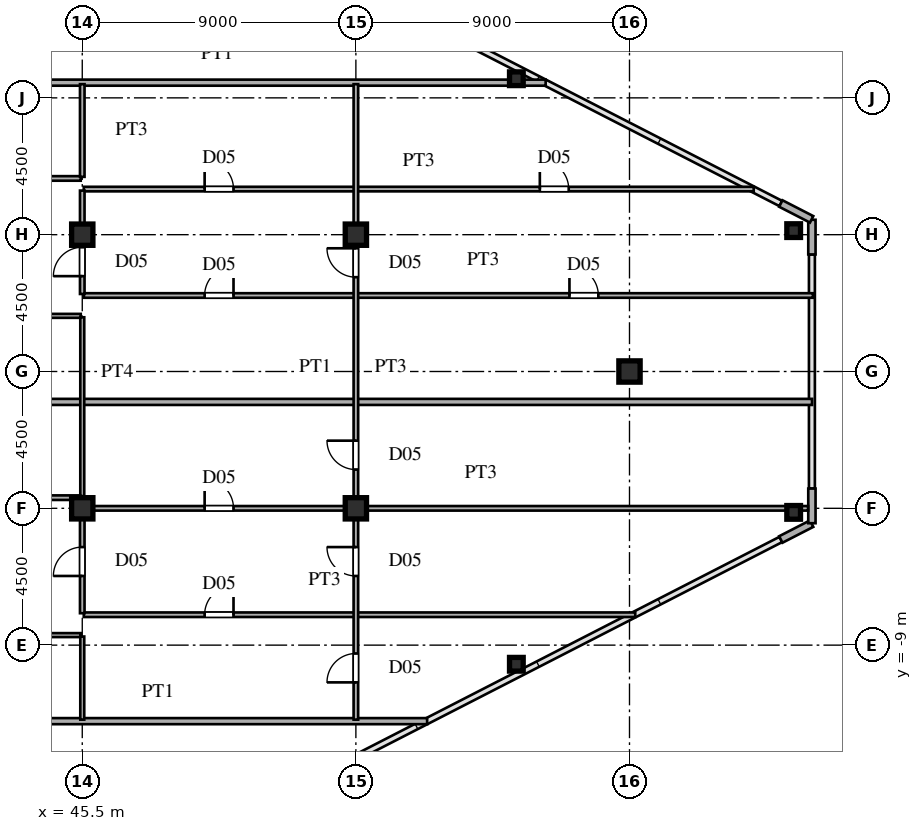
"""IFC4 building model, lengths in metres.
Left out: names, types, materials, properties, quantities, classifications, styles, units other than length and angle.
Written with IfcOpenShell. Run it as: python <this file> out.ifc"""

import sys

from ifc_helpers import new_model, si_unit, direction, frame, frame_2d, origin, origin_2d, place, context, subcontext, project, spatial, rectangle, hollow_rectangle, i_section, extrude, source, transform, mapped, element, fill, save


model = new_model("IFC4")
c1 = context("Model", 3, precision=1e-05, world=origin(), true_north=direction((0.0, 1.0)))
c2 = subcontext(c1, "Body", "Model", "MODEL_VIEW")
j1 = project(units=[si_unit("LENGTHUNIT", "METRE"), si_unit("PLANEANGLEUNIT", "RADIAN")], contexts=[c1])
p1 = place(None, origin())
s1 = spatial("IfcSite", under=j1, at=p1, CompositionType="ELEMENT")
p2 = place(p1, origin())
s2 = spatial("IfcBuilding", under=s1, at=p2, CompositionType="ELEMENT")
p3 = place(p2, frame((0.0, 0.0, 147.6)))
s3 = spatial("IfcBuildingStorey", under=s2, at=p3, CompositionType="ELEMENT", Elevation=147.6)
m1 = source(origin(), c2, "Body", "SweptSolid", [
    extrude(i_section(OverallWidth=0.7, OverallDepth=0.7, WebThickness=0.028, FlangeThickness=0.045, at=origin_2d()), origin(), (0.0, 0.0, 1.0), 3.6),
])
for number, where, z_axis, x_axis in (
    (1, (45.5, -4.5, 0.0), (0.0, 0.0, 1.0), (1.0, 0.0, 0.0)),
    (2, (45.5, 4.5, 0.0), (0.0, 0.0, 1.0), (1.0, 0.0, 0.0)),
    (3, (54.5, -4.5, 0.0), (0.0, 0.0, 1.0), (1.0, 0.0, 0.0)),
    (4, (54.5, 4.5, 0.0), (0.0, 0.0, 1.0), (1.0, 0.0, 0.0)),
    (5, (63.5, 0.0, 0.0), (0.0, 0.0, 1.0), (1.0, 0.0, 0.0)),
):
    element("IfcColumn", number, at=place(p3, frame(where, z_axis=z_axis, x_axis=x_axis)), inside=s3, PredefinedType="COLUMN", context=c2, shape_type="MappedRepresentation", body=[
        mapped(m1, transform((0.0, 0.0, 0.0), scale=1.0)),
    ])
m2 = source(origin(), c2, "Body", "SweptSolid", [
    extrude(hollow_rectangle(XDim=0.45, YDim=0.45, WallThickness=0.018, at=origin_2d()), origin(), (0.0, 0.0, 1.0), 3.6),
])
for number, where, z_axis, x_axis in (
    (6, (68.9, -4.634, 0.0), (0.0, 0.0, 1.0), (1.0, 0.0, 0.0)),
    (7, (68.9, 4.634, 0.0), (0.0, 0.0, 1.0), (1.0, 0.0, 0.0)),
    (8, (59.779, -9.629, 0.0), (0.0, 0.0, 1.0), (1.0, 0.0, 0.0)),
    (9, (59.779, 9.629, 0.0), (0.0, 0.0, 1.0), (1.0, 0.0, 0.0)),
):
    element("IfcColumn", number, at=place(p3, frame(where, z_axis=z_axis, x_axis=x_axis)), inside=s3, PredefinedType="COLUMN", context=c2, shape_type="MappedRepresentation", body=[
        mapped(m2, transform((0.0, 0.0, 0.0), scale=1.0)),
    ])
p4 = place(p3, frame((68.477, -5.525, 0.0), z_axis=(0.0, 0.0, 1.0), x_axis=(0.889797395748, 0.456355776255, 0.0)))
e10 = element("IfcWall", 10, at=p4, inside=s3, PredefinedType="SOLIDWALL", context=c2, shape_type="SweptSolid", body=[
    extrude(rectangle(XDim=1.14, YDim=0.24, at=frame_2d((0.57, 0.0))), origin(), (0.0, 0.0, 1.0), 3.38),
])
for number, where, z_axis, x_axis in (
    (11, (69.5, -4.99, 0.0), (0.0, 0.0, 1.0), (0.0, 1.0, 0.0)),
    (12, (69.5, 3.85, 0.0), (0.0, 0.0, 1.0), (0.0, 1.0, 0.0)),
):
    element("IfcWall", number, at=place(p3, frame(where, z_axis=z_axis, x_axis=x_axis)), inside=s3, PredefinedType="SOLIDWALL", context=c2, shape_type="SweptSolid", body=[
        extrude(rectangle(XDim=1.14, YDim=0.24, at=frame_2d((0.57, 0.0))), origin(), (0.0, 0.0, 1.0), 3.38),
    ])
p5 = place(p3, frame((69.491, 5.005, 0.0), z_axis=(0.0, 0.0, 1.0), x_axis=(-0.889797395748, 0.456355776255, 0.0)))
e13 = element("IfcWall", 13, at=p5, inside=s3, PredefinedType="SOLIDWALL", context=c2, shape_type="SweptSolid", body=[
    extrude(rectangle(XDim=1.14, YDim=0.24, at=frame_2d((0.57, 0.0))), origin(), (0.0, 0.0, 1.0), 3.38),
])
p6 = place(p3, frame((39.13, -11.5, 0.0), z_axis=(0.0, 0.0, 1.0), x_axis=(1.0, 0.0, 0.0)))
e14 = element("IfcWall", 14, at=p6, inside=s3, PredefinedType="PARTITIONING", context=c2, shape_type="SweptSolid", body=[
    extrude(rectangle(XDim=17.714, YDim=0.2, at=frame_2d((8.857, 0.0))), origin(), (0.0, 0.0, 1.0), 3.38),
])
p7 = place(p3, frame((39.1, -8.67, 0.0), z_axis=(0.0, 0.0, 1.0), x_axis=(1.0, 0.0, 0.0)))
e15 = element("IfcWall", 15, at=p7, inside=s3, PredefinedType="PARTITIONING", context=c2, shape_type="SweptSolid", body=[
    extrude(rectangle(XDim=6.35, YDim=0.13, at=frame_2d((3.175, 0.0))), origin(), (0.0, 0.0, 1.0), 3.38),
])
p8 = place(p7, frame((2.735, 0.0, 0.0)))
e16 = element("IfcOpeningElement", 16, at=p8, cuts=e15, PredefinedType="OPENING", context=c2, shape_type="SweptSolid", body=[
    extrude(rectangle(XDim=0.88, YDim=2.1, at=frame_2d((0.44, 1.05))), frame((0.0, 0.075, 0.0), z_axis=(0.0, -1.0, 0.0), x_axis=(1.0, 0.0, 0.0)), (0.0, 0.0, 1.0), 0.15),
])
p9 = place(p3, frame((45.55, -8.0, 0.0), z_axis=(0.0, 0.0, 1.0), x_axis=(1.0, 0.0, 0.0)))
e17 = element("IfcWall", 17, at=p9, inside=s3, PredefinedType="PARTITIONING", context=c2, shape_type="SweptSolid", body=[
    extrude(rectangle(XDim=18.139, YDim=0.15, at=frame_2d((9.069, 0.0))), origin(), (0.0, 0.0, 1.0), 3.38),
])
p10 = place(p9, frame((3.975, 0.0, 0.0)))
e18 = element("IfcOpeningElement", 18, at=p10, cuts=e17, PredefinedType="OPENING", context=c2, shape_type="SweptSolid", body=[
    extrude(rectangle(XDim=0.95, YDim=2.15, at=frame_2d((0.475, 1.075))), frame((0.0, 0.085, 0.0), z_axis=(0.0, -1.0, 0.0), x_axis=(1.0, 0.0, 0.0)), (0.0, 0.0, 1.0), 0.17),
])
p11 = place(p3, frame((45.55, -4.5, 0.0), z_axis=(0.0, 0.0, 1.0), x_axis=(1.0, 0.0, 0.0)))
e19 = element("IfcWall", 19, at=p11, inside=s3, PredefinedType="PARTITIONING", context=c2, shape_type="SweptSolid", body=[
    extrude(rectangle(XDim=23.825, YDim=0.15, at=frame_2d((11.913, 0.0))), origin(), (0.0, 0.0, 1.0), 2.78),
])
p12 = place(p11, frame((3.975, 0.0, 0.0)))
e20 = element("IfcOpeningElement", 20, at=p12, cuts=e19, PredefinedType="OPENING", context=c2, shape_type="SweptSolid", body=[
    extrude(rectangle(XDim=0.95, YDim=2.15, at=frame_2d((0.475, 1.075))), frame((0.0, 0.085, 0.0), z_axis=(0.0, -1.0, 0.0), x_axis=(1.0, 0.0, 0.0)), (0.0, 0.0, 1.0), 0.17),
])
p13 = place(p3, frame((39.1, -4.15, 0.0), z_axis=(0.0, 0.0, 1.0), x_axis=(1.0, 0.0, 0.0)))
e21 = element("IfcWall", 21, at=p13, inside=s3, PredefinedType="PARTITIONING", context=c2, shape_type="SweptSolid", body=[
    extrude(rectangle(XDim=6.35, YDim=0.15, at=frame_2d((3.175, 0.0))), origin(), (0.0, 0.0, 1.0), 3.38),
])
p14 = place(p13, frame((2.7, 0.0, 0.0)))
e22 = element("IfcOpeningElement", 22, at=p14, cuts=e21, PredefinedType="OPENING", context=c2, shape_type="SweptSolid", body=[
    extrude(rectangle(XDim=0.95, YDim=2.15, at=frame_2d((0.475, 1.075))), frame((0.0, 0.085, 0.0), z_axis=(0.0, -1.0, 0.0), x_axis=(1.0, 0.0, 0.0)), (0.0, 0.0, 1.0), 0.17),
])
p15 = place(p3, frame((39.13, -1.0, 0.0), z_axis=(0.0, 0.0, 1.0), x_axis=(1.0, 0.0, 0.0)))
e23 = element("IfcWall", 23, at=p15, inside=s3, PredefinedType="PARTITIONING", context=c2, shape_type="SweptSolid", body=[
    extrude(rectangle(XDim=30.375, YDim=0.2, at=frame_2d((15.188, 0.0))), origin(), (0.0, 0.0, 1.0), 3.38),
])
p16 = place(p3, frame((39.1, 1.83, 0.0), z_axis=(0.0, 0.0, 1.0), x_axis=(1.0, 0.0, 0.0)))
e24 = element("IfcWall", 24, at=p16, inside=s3, PredefinedType="PARTITIONING", context=c2, shape_type="SweptSolid", body=[
    extrude(rectangle(XDim=6.35, YDim=0.13, at=frame_2d((3.175, 0.0))), origin(), (0.0, 0.0, 1.0), 3.38),
])
p17 = place(p16, frame((2.735, 0.0, 0.0)))
e25 = element("IfcOpeningElement", 25, at=p17, cuts=e24, PredefinedType="OPENING", context=c2, shape_type="SweptSolid", body=[
    extrude(rectangle(XDim=0.88, YDim=2.1, at=frame_2d((0.44, 1.05))), frame((0.0, 0.075, 0.0), z_axis=(0.0, -1.0, 0.0), x_axis=(1.0, 0.0, 0.0)), (0.0, 0.0, 1.0), 0.15),
])
p18 = place(p3, frame((45.55, 2.5, 0.0), z_axis=(0.0, 0.0, 1.0), x_axis=(1.0, 0.0, 0.0)))
e26 = element("IfcWall", 26, at=p18, inside=s3, PredefinedType="PARTITIONING", context=c2, shape_type="SweptSolid", body=[
    extrude(rectangle(XDim=23.985, YDim=0.15, at=frame_2d((11.992, 0.0))), origin(), (0.0, 0.0, 1.0), 3.38),
])
p19 = place(p18, frame((3.975, 0.0, 0.0)))
e27 = element("IfcOpeningElement", 27, at=p19, cuts=e26, PredefinedType="OPENING", context=c2, shape_type="SweptSolid", body=[
    extrude(rectangle(XDim=0.95, YDim=2.15, at=frame_2d((0.475, 1.075))), frame((0.0, 0.085, 0.0), z_axis=(0.0, -1.0, 0.0), x_axis=(1.0, 0.0, 0.0)), (0.0, 0.0, 1.0), 0.17),
])
p20 = place(p18, frame((15.975, 0.0, 0.0)))
e28 = element("IfcOpeningElement", 28, at=p20, cuts=e26, PredefinedType="OPENING", context=c2, shape_type="SweptSolid", body=[
    extrude(rectangle(XDim=0.95, YDim=2.15, at=frame_2d((0.475, 1.075))), frame((0.0, 0.085, 0.0), z_axis=(0.0, -1.0, 0.0), x_axis=(1.0, 0.0, 0.0)), (0.0, 0.0, 1.0), 0.17),
])
p21 = place(p3, frame((45.55, 6.0, 0.0), z_axis=(0.0, 0.0, 1.0), x_axis=(1.0, 0.0, 0.0)))
e29 = element("IfcWall", 29, at=p21, inside=s3, PredefinedType="PARTITIONING", context=c2, shape_type="SweptSolid", body=[
    extrude(rectangle(XDim=22.036, YDim=0.15, at=frame_2d((11.018, 0.0))), origin(), (0.0, 0.0, 1.0), 3.38),
])
p22 = place(p21, frame((3.975, 0.0, 0.0)))
e30 = element("IfcOpeningElement", 30, at=p22, cuts=e29, PredefinedType="OPENING", context=c2, shape_type="SweptSolid", body=[
    extrude(rectangle(XDim=0.95, YDim=2.15, at=frame_2d((0.475, 1.075))), frame((0.0, 0.085, 0.0), z_axis=(0.0, -1.0, 0.0), x_axis=(1.0, 0.0, 0.0)), (0.0, 0.0, 1.0), 0.17),
])
p23 = place(p21, frame((15.001, 0.0, 0.0)))
e31 = element("IfcOpeningElement", 31, at=p23, cuts=e29, PredefinedType="OPENING", context=c2, shape_type="SweptSolid", body=[
    extrude(rectangle(XDim=0.95, YDim=2.15, at=frame_2d((0.475, 1.075))), frame((0.0, 0.085, 0.0), z_axis=(0.0, -1.0, 0.0), x_axis=(1.0, 0.0, 0.0)), (0.0, 0.0, 1.0), 0.17),
])
p24 = place(p3, frame((39.1, 6.35, 0.0), z_axis=(0.0, 0.0, 1.0), x_axis=(1.0, 0.0, 0.0)))
e32 = element("IfcWall", 32, at=p24, inside=s3, PredefinedType="PARTITIONING", context=c2, shape_type="SweptSolid", body=[
    extrude(rectangle(XDim=6.35, YDim=0.15, at=frame_2d((3.175, 0.0))), origin(), (0.0, 0.0, 1.0), 3.38),
])
p25 = place(p24, frame((2.7, 0.0, 0.0)))
e33 = element("IfcOpeningElement", 33, at=p25, cuts=e32, PredefinedType="OPENING", context=c2, shape_type="SweptSolid", body=[
    extrude(rectangle(XDim=0.95, YDim=2.15, at=frame_2d((0.475, 1.075))), frame((0.0, 0.085, 0.0), z_axis=(0.0, -1.0, 0.0), x_axis=(1.0, 0.0, 0.0)), (0.0, 0.0, 1.0), 0.17),
])
p26 = place(p3, frame((39.13, 9.5, 0.0), z_axis=(0.0, 0.0, 1.0), x_axis=(1.0, 0.0, 0.0)))
e34 = element("IfcWall", 34, at=p26, inside=s3, PredefinedType="PARTITIONING", context=c2, shape_type="SweptSolid", body=[
    extrude(rectangle(XDim=21.612, YDim=0.2, at=frame_2d((10.806, 0.0))), origin(), (0.0, 0.0, 1.0), 3.38),
])
p27 = place(p3, frame((45.5, -11.45, 0.0), z_axis=(0.0, 0.0, 1.0), x_axis=(0.0, 1.0, 0.0)))
e35 = element("IfcWall", 35, at=p27, inside=s3, PredefinedType="PARTITIONING", context=c2, shape_type="SweptSolid", body=[
    extrude(rectangle(XDim=2.733, YDim=0.13, at=frame_2d((1.366, 0.0))), origin(), (0.0, 0.0, 1.0), 2.78),
])
p28 = place(p3, frame((45.5, -7.95, 0.0), z_axis=(0.0, 0.0, 1.0), x_axis=(0.0, 1.0, 0.0)))
e36 = element("IfcWall", 36, at=p28, inside=s3, PredefinedType="PARTITIONING", context=c2, shape_type="SweptSolid", body=[
    extrude(rectangle(XDim=3.4, YDim=0.15, at=frame_2d((1.7, 0.0))), origin(), (0.0, 0.0, 1.0), 2.78),
])
p29 = place(p28, frame((1.225, 0.0, 0.0)))
e37 = element("IfcOpeningElement", 37, at=p29, cuts=e36, PredefinedType="OPENING", context=c2, shape_type="SweptSolid", body=[
    extrude(rectangle(XDim=0.95, YDim=2.15, at=frame_2d((0.475, 1.075))), frame((0.0, 0.085, 0.0), z_axis=(0.0, -1.0, 0.0), x_axis=(1.0, 0.0, 0.0)), (0.0, 0.0, 1.0), 0.17),
])
p30 = place(p3, frame((45.5, -4.098, 0.0), z_axis=(0.0, 0.0, 1.0), x_axis=(0.0, 1.0, 0.0)))
e38 = element("IfcWall", 38, at=p30, inside=s3, PredefinedType="PARTITIONING", context=c2, shape_type="SweptSolid", body=[
    extrude(rectangle(XDim=5.881, YDim=0.13, at=frame_2d((2.94, 0.0))), origin(), (0.0, 0.0, 1.0), 2.78),
])
p31 = place(p3, frame((45.5, 2.55, 0.0), z_axis=(0.0, 0.0, 1.0), x_axis=(0.0, 1.0, 0.0)))
e39 = element("IfcWall", 39, at=p31, inside=s3, PredefinedType="PARTITIONING", context=c2, shape_type="SweptSolid", body=[
    extrude(rectangle(XDim=3.4, YDim=0.15, at=frame_2d((1.7, 0.0))), origin(), (0.0, 0.0, 1.0), 2.78),
])
p32 = place(p31, frame((0.586, 0.0, 0.0)))
e40 = element("IfcOpeningElement", 40, at=p32, cuts=e39, PredefinedType="OPENING", context=c2, shape_type="SweptSolid", body=[
    extrude(rectangle(XDim=0.95, YDim=2.15, at=frame_2d((0.475, 1.075))), frame((0.0, 0.085, 0.0), z_axis=(0.0, -1.0, 0.0), x_axis=(1.0, 0.0, 0.0)), (0.0, 0.0, 1.0), 0.17),
])
p33 = place(p3, frame((45.5, 6.402, 0.0), z_axis=(0.0, 0.0, 1.0), x_axis=(0.0, 1.0, 0.0)))
e41 = element("IfcWall", 41, at=p33, inside=s3, PredefinedType="PARTITIONING", context=c2, shape_type="SweptSolid", body=[
    extrude(rectangle(XDim=3.048, YDim=0.15, at=frame_2d((1.524, 0.0))), origin(), (0.0, 0.0, 1.0), 2.78),
])
p34 = place(p3, frame((54.5, -11.45, 0.0), z_axis=(0.0, 0.0, 1.0), x_axis=(0.0, 1.0, 0.0)))
e42 = element("IfcWall", 42, at=p34, inside=s3, PredefinedType="PARTITIONING", context=c2, shape_type="SweptSolid", body=[
    extrude(rectangle(XDim=20.9, YDim=0.15, at=frame_2d((10.45, 0.0))), origin(), (0.0, 0.0, 1.0), 2.78),
])
p35 = place(p34, frame((4.725, 0.0, 0.0)))
e43 = element("IfcOpeningElement", 43, at=p35, cuts=e42, PredefinedType="OPENING", context=c2, shape_type="SweptSolid", body=[
    extrude(rectangle(XDim=0.95, YDim=2.15, at=frame_2d((0.475, 1.075))), frame((0.0, 0.085, 0.0), z_axis=(0.0, -1.0, 0.0), x_axis=(1.0, 0.0, 0.0)), (0.0, 0.0, 1.0), 0.17),
])
p36 = place(p34, frame((1.225, 0.0, 0.0)))
e44 = element("IfcOpeningElement", 44, at=p36, cuts=e42, PredefinedType="OPENING", context=c2, shape_type="SweptSolid", body=[
    extrude(rectangle(XDim=0.95, YDim=2.15, at=frame_2d((0.475, 1.075))), frame((0.0, 0.085, 0.0), z_axis=(0.0, -1.0, 0.0), x_axis=(1.0, 0.0, 0.0)), (0.0, 0.0, 1.0), 0.17),
])
p37 = place(p34, frame((8.225, 0.0, 0.0)))
e45 = element("IfcOpeningElement", 45, at=p37, cuts=e42, PredefinedType="OPENING", context=c2, shape_type="SweptSolid", body=[
    extrude(rectangle(XDim=0.95, YDim=2.15, at=frame_2d((0.475, 1.075))), frame((0.0, 0.085, 0.0), z_axis=(0.0, -1.0, 0.0), x_axis=(1.0, 0.0, 0.0)), (0.0, 0.0, 1.0), 0.17),
])
p38 = place(p34, frame((14.552, 0.0, 0.0)))
e46 = element("IfcOpeningElement", 46, at=p38, cuts=e42, PredefinedType="OPENING", context=c2, shape_type="SweptSolid", body=[
    extrude(rectangle(XDim=0.95, YDim=2.15, at=frame_2d((0.475, 1.075))), frame((0.0, 0.085, 0.0), z_axis=(0.0, -1.0, 0.0), x_axis=(1.0, 0.0, 0.0)), (0.0, 0.0, 1.0), 0.17),
])
m3 = source(origin(), c2, "Body", "SweptSolid", [
    extrude(rectangle(XDim=0.95, YDim=2.15, at=frame_2d((0.475, 1.075))), frame((0.0, 0.025, 0.0), z_axis=(0.0, -1.0, 0.0), x_axis=(1.0, 0.0, 0.0)), (0.0, 0.0, 1.0), 0.05),
])
p39 = place(p10, origin())
e47 = element("IfcDoor", 47, at=p39, inside=s3, OperationType="SINGLE_SWING_RIGHT", PredefinedType="DOOR", context=c2, shape_type="MappedRepresentation", body=[
    mapped(m3, transform((0.0, 0.0, 0.0), scale=1.0)),
])
fill(e18, e47)
p40 = place(p12, origin())
e48 = element("IfcDoor", 48, at=p40, inside=s3, OperationType="SINGLE_SWING_LEFT", PredefinedType="DOOR", context=c2, shape_type="MappedRepresentation", body=[
    mapped(m3, transform((0.0, 0.0, 0.0), scale=1.0)),
])
fill(e20, e48)
p41 = place(p19, origin())
e49 = element("IfcDoor", 49, at=p41, inside=s3, OperationType="SINGLE_SWING_RIGHT", PredefinedType="DOOR", context=c2, shape_type="MappedRepresentation", body=[
    mapped(m3, transform((0.0, 0.0, 0.0), scale=1.0)),
])
fill(e27, e49)
p42 = place(p20, origin())
e50 = element("IfcDoor", 50, at=p42, inside=s3, OperationType="SINGLE_SWING_LEFT", PredefinedType="DOOR", context=c2, shape_type="MappedRepresentation", body=[
    mapped(m3, transform((0.0, 0.0, 0.0), scale=1.0)),
])
fill(e28, e50)
p43 = place(p22, origin())
e51 = element("IfcDoor", 51, at=p43, inside=s3, OperationType="SINGLE_SWING_LEFT", PredefinedType="DOOR", context=c2, shape_type="MappedRepresentation", body=[
    mapped(m3, transform((0.0, 0.0, 0.0), scale=1.0)),
])
fill(e30, e51)
p44 = place(p23, origin())
e52 = element("IfcDoor", 52, at=p44, inside=s3, OperationType="SINGLE_SWING_LEFT", PredefinedType="DOOR", context=c2, shape_type="MappedRepresentation", body=[
    mapped(m3, transform((0.0, 0.0, 0.0), scale=1.0)),
])
fill(e31, e52)
p45 = place(p29, origin())
e53 = element("IfcDoor", 53, at=p45, inside=s3, OperationType="SINGLE_SWING_LEFT", PredefinedType="DOOR", context=c2, shape_type="MappedRepresentation", body=[
    mapped(m3, transform((0.0, 0.0, 0.0), scale=1.0)),
])
fill(e37, e53)
p46 = place(p32, origin())
e54 = element("IfcDoor", 54, at=p46, inside=s3, OperationType="SINGLE_SWING_LEFT", PredefinedType="DOOR", context=c2, shape_type="MappedRepresentation", body=[
    mapped(m3, transform((0.0, 0.0, 0.0), scale=1.0)),
])
fill(e40, e54)
p47 = place(p35, origin())
e55 = element("IfcDoor", 55, at=p47, inside=s3, OperationType="SINGLE_SWING_RIGHT", PredefinedType="DOOR", context=c2, shape_type="MappedRepresentation", body=[
    mapped(m3, transform((0.0, 0.0, 0.0), scale=1.0)),
])
fill(e43, e55)
p48 = place(p36, origin())
e56 = element("IfcDoor", 56, at=p48, inside=s3, OperationType="SINGLE_SWING_LEFT", PredefinedType="DOOR", context=c2, shape_type="MappedRepresentation", body=[
    mapped(m3, transform((0.0, 0.0, 0.0), scale=1.0)),
])
fill(e44, e56)
p49 = place(p37, origin())
e57 = element("IfcDoor", 57, at=p49, inside=s3, OperationType="SINGLE_SWING_RIGHT", PredefinedType="DOOR", context=c2, shape_type="MappedRepresentation", body=[
    mapped(m3, transform((0.0, 0.0, 0.0), scale=1.0)),
])
fill(e45, e57)
p50 = place(p38, origin())
e58 = element("IfcDoor", 58, at=p50, inside=s3, OperationType="SINGLE_SWING_RIGHT", PredefinedType="DOOR", context=c2, shape_type="MappedRepresentation", body=[
    mapped(m3, transform((0.0, 0.0, 0.0), scale=1.0)),
])
fill(e46, e58)
save(model, sys.argv[1])
